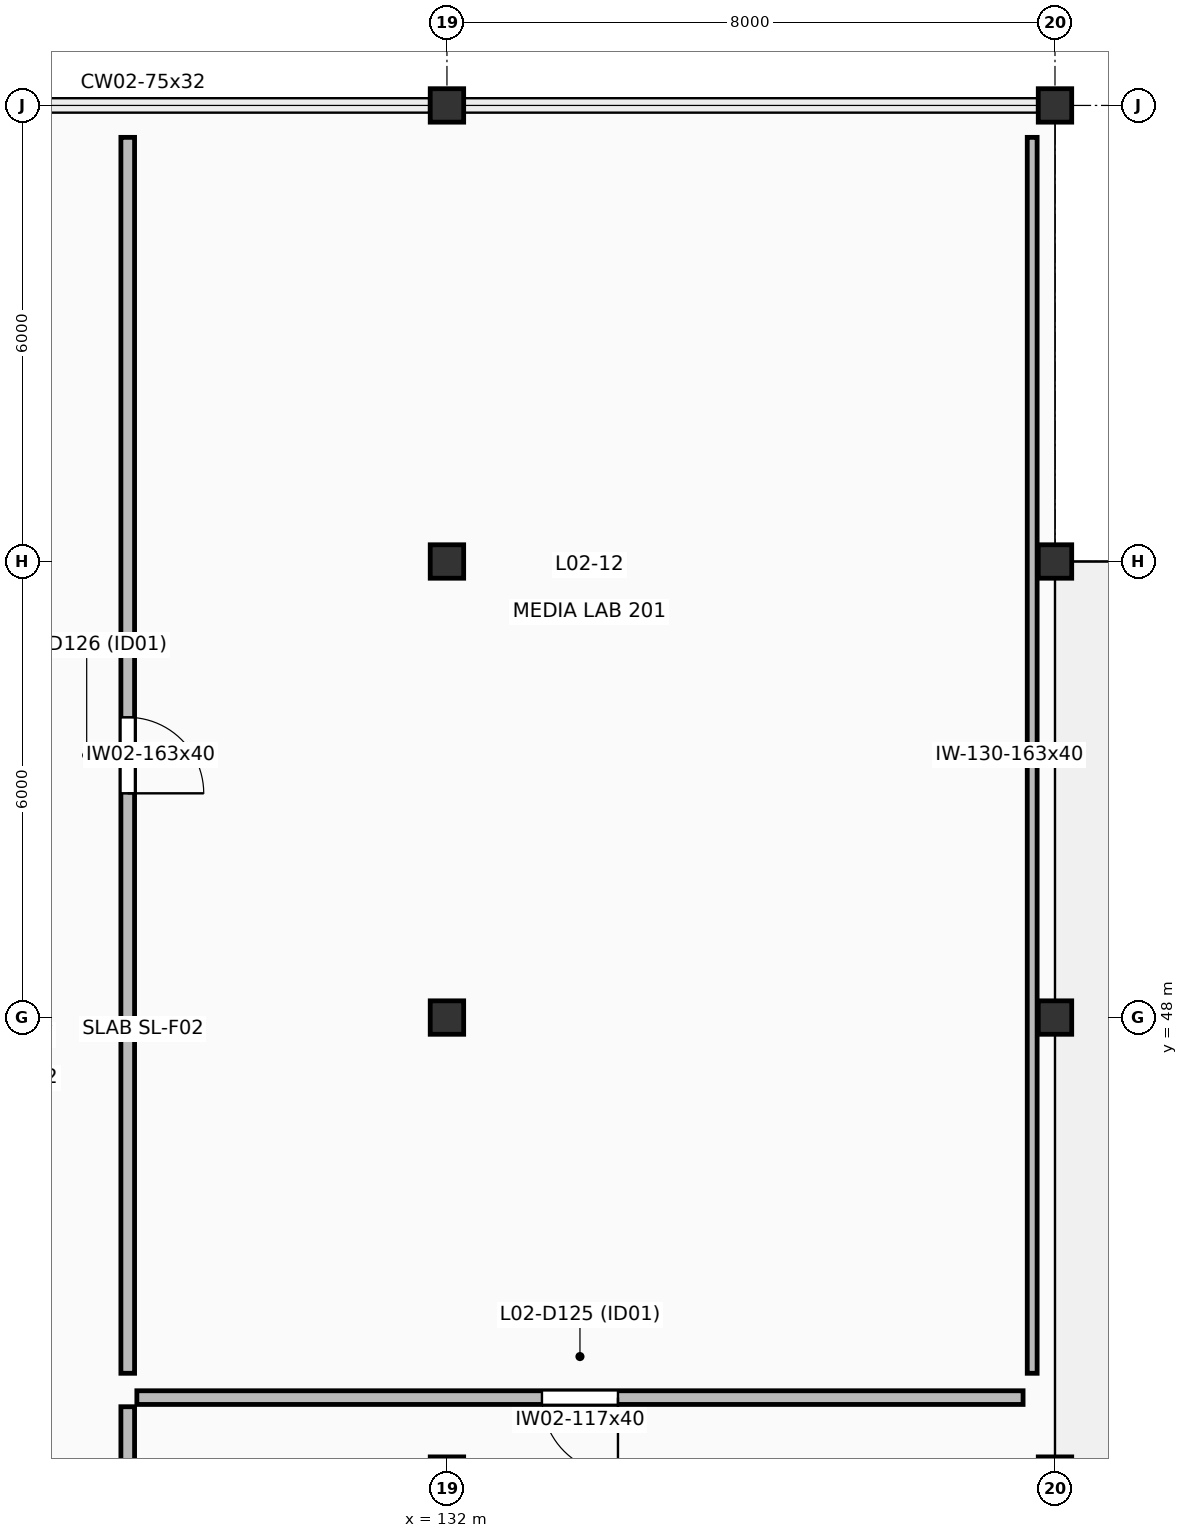
"""IFC4 building model, lengths in metres.
Left out: names, types, materials, properties, quantities, classifications, styles, units other than length and angle.
Written with IfcOpenShell. Run it as: python <this file> out.ifc"""

import sys

from ifc_helpers import new_model, si_unit, direction, frame, frame_2d, origin, origin_2d, place, context, subcontext, project, spatial, rectangle, extrude, element, fill, save


model = new_model("IFC4")
c1 = context("Model", 3, precision=1e-05, world=origin(), true_north=direction((0.0, 1.0)))
c2 = subcontext(c1, "Body", "Model", "MODEL_VIEW")
j1 = project(units=[si_unit("LENGTHUNIT", "METRE"), si_unit("PLANEANGLEUNIT", "RADIAN")], contexts=[c1])
p1 = place(None, origin())
s1 = spatial("IfcSite", under=j1, at=p1, CompositionType="ELEMENT")
p2 = place(p1, origin())
s2 = spatial("IfcBuilding", under=s1, at=p2, CompositionType="ELEMENT")
p3 = place(p2, frame((0.0, 0.0, 9.6)))
s3 = spatial("IfcBuildingStorey", under=s2, at=p3, CompositionType="ELEMENT", Elevation=9.6)
for number, where, z_axis, x_axis in (
    (1, (132.0, 42.0, 0.0), (0.0, 0.0, 1.0), (1.0, 0.0, 0.0)),
    (2, (132.0, 48.0, 0.0), (0.0, 0.0, 1.0), (1.0, 0.0, 0.0)),
    (3, (132.0, 54.0, 0.0), (0.0, 0.0, 1.0), (1.0, 0.0, 0.0)),
    (4, (132.0, 60.0, 0.0), (0.0, 0.0, 1.0), (1.0, 0.0, 0.0)),
    (5, (140.0, 42.0, 0.0), (0.0, 0.0, 1.0), (1.0, 0.0, 0.0)),
    (6, (140.0, 48.0, 0.0), (0.0, 0.0, 1.0), (1.0, 0.0, 0.0)),
    (7, (140.0, 54.0, 0.0), (0.0, 0.0, 1.0), (1.0, 0.0, 0.0)),
    (8, (140.0, 60.0, 0.0), (0.0, 0.0, 1.0), (1.0, 0.0, 0.0)),
):
    element("IfcColumn", number, at=place(p3, frame(where, z_axis=z_axis, x_axis=x_axis)), inside=s3, PredefinedType="COLUMN", context=c2, shape_type="SweptSolid", body=[
        extrude(rectangle(XDim=0.44, YDim=0.44, at=origin_2d()), origin(), (0.0, 0.0, 1.0), 4.2),
    ])
p4 = place(p3, frame((139.58, 43.0, 0.0), z_axis=(0.0, 0.0, 1.0), x_axis=(-1.0, 0.0, 0.0)))
e9 = element("IfcWall", 9, at=p4, inside=s3, PredefinedType="PARTITIONING", context=c2, shape_type="SweptSolid", body=[
    extrude(rectangle(XDim=11.66, YDim=0.18, at=frame_2d((5.83, 0.0))), origin(), (0.0, 0.0, 1.0), 3.98),
])
p5 = place(p4, frame((5.33, 0.0, 0.0)))
e10 = element("IfcOpeningElement", 10, at=p5, cuts=e9, PredefinedType="OPENING", context=c2, shape_type="SweptSolid", body=[
    extrude(rectangle(XDim=1.0, YDim=2.15, at=frame_2d((0.5, 1.075))), frame((0.0, 0.1, 0.0), z_axis=(0.0, -1.0, 0.0), x_axis=(1.0, 0.0, 0.0)), (0.0, 0.0, 1.0), 0.2),
])
p6 = place(p3, frame((127.8, 42.88, 0.0), z_axis=(0.0, 0.0, 1.0), x_axis=(0.0, -1.0, 0.0)))
e11 = element("IfcWall", 11, at=p6, inside=s3, PredefinedType="PARTITIONING", context=c2, shape_type="SweptSolid", body=[
    extrude(rectangle(XDim=17.76, YDim=0.18, at=frame_2d((8.88, 0.0))), origin(), (0.0, 0.0, 1.0), 3.98),
])
p7 = place(p3, frame((127.8, 59.58, 0.0), z_axis=(0.0, 0.0, 1.0), x_axis=(0.0, -1.0, 0.0)))
e12 = element("IfcWall", 12, at=p7, inside=s3, PredefinedType="PARTITIONING", context=c2, shape_type="SweptSolid", body=[
    extrude(rectangle(XDim=16.26, YDim=0.18, at=frame_2d((8.13, 0.0))), origin(), (0.0, 0.0, 1.0), 3.98),
])
p8 = place(p7, frame((7.63, 0.0, 0.0)))
e13 = element("IfcOpeningElement", 13, at=p8, cuts=e12, PredefinedType="OPENING", context=c2, shape_type="SweptSolid", body=[
    extrude(rectangle(XDim=1.0, YDim=2.15, at=frame_2d((0.5, 1.075))), frame((0.0, 0.1, 0.0), z_axis=(0.0, -1.0, 0.0), x_axis=(1.0, 0.0, 0.0)), (0.0, 0.0, 1.0), 0.2),
])
p9 = place(p3, frame((139.7, 43.32, 0.0), z_axis=(0.0, 0.0, 1.0), x_axis=(0.0, 1.0, 0.0)))
e14 = element("IfcWall", 14, at=p9, inside=s3, PredefinedType="PARTITIONING", context=c2, shape_type="SweptSolid", body=[
    extrude(rectangle(XDim=16.26, YDim=0.13, at=frame_2d((8.13, 0.0))), origin(), (0.0, 0.0, 1.0), 3.98),
])
p10 = place(p5, origin())
e15 = element("IfcDoor", 15, at=p10, inside=s3, OperationType="SINGLE_SWING_LEFT", PredefinedType="DOOR", context=c2, shape_type="SweptSolid", body=[
    extrude(rectangle(XDim=1.0, YDim=2.15, at=frame_2d((0.5, 1.075))), frame((0.0, 0.025, 0.0), z_axis=(0.0, -1.0, 0.0), x_axis=(1.0, 0.0, 0.0)), (0.0, 0.0, 1.0), 0.05),
])
fill(e10, e15)
p11 = place(p8, origin())
e16 = element("IfcDoor", 16, at=p11, inside=s3, OperationType="SINGLE_SWING_RIGHT", PredefinedType="DOOR", context=c2, shape_type="SweptSolid", body=[
    extrude(rectangle(XDim=1.0, YDim=2.15, at=frame_2d((0.5, 1.075))), frame((0.0, 0.025, 0.0), z_axis=(0.0, -1.0, 0.0), x_axis=(1.0, 0.0, 0.0)), (0.0, 0.0, 1.0), 0.05),
])
fill(e13, e16)
save(model, sys.argv[1])
